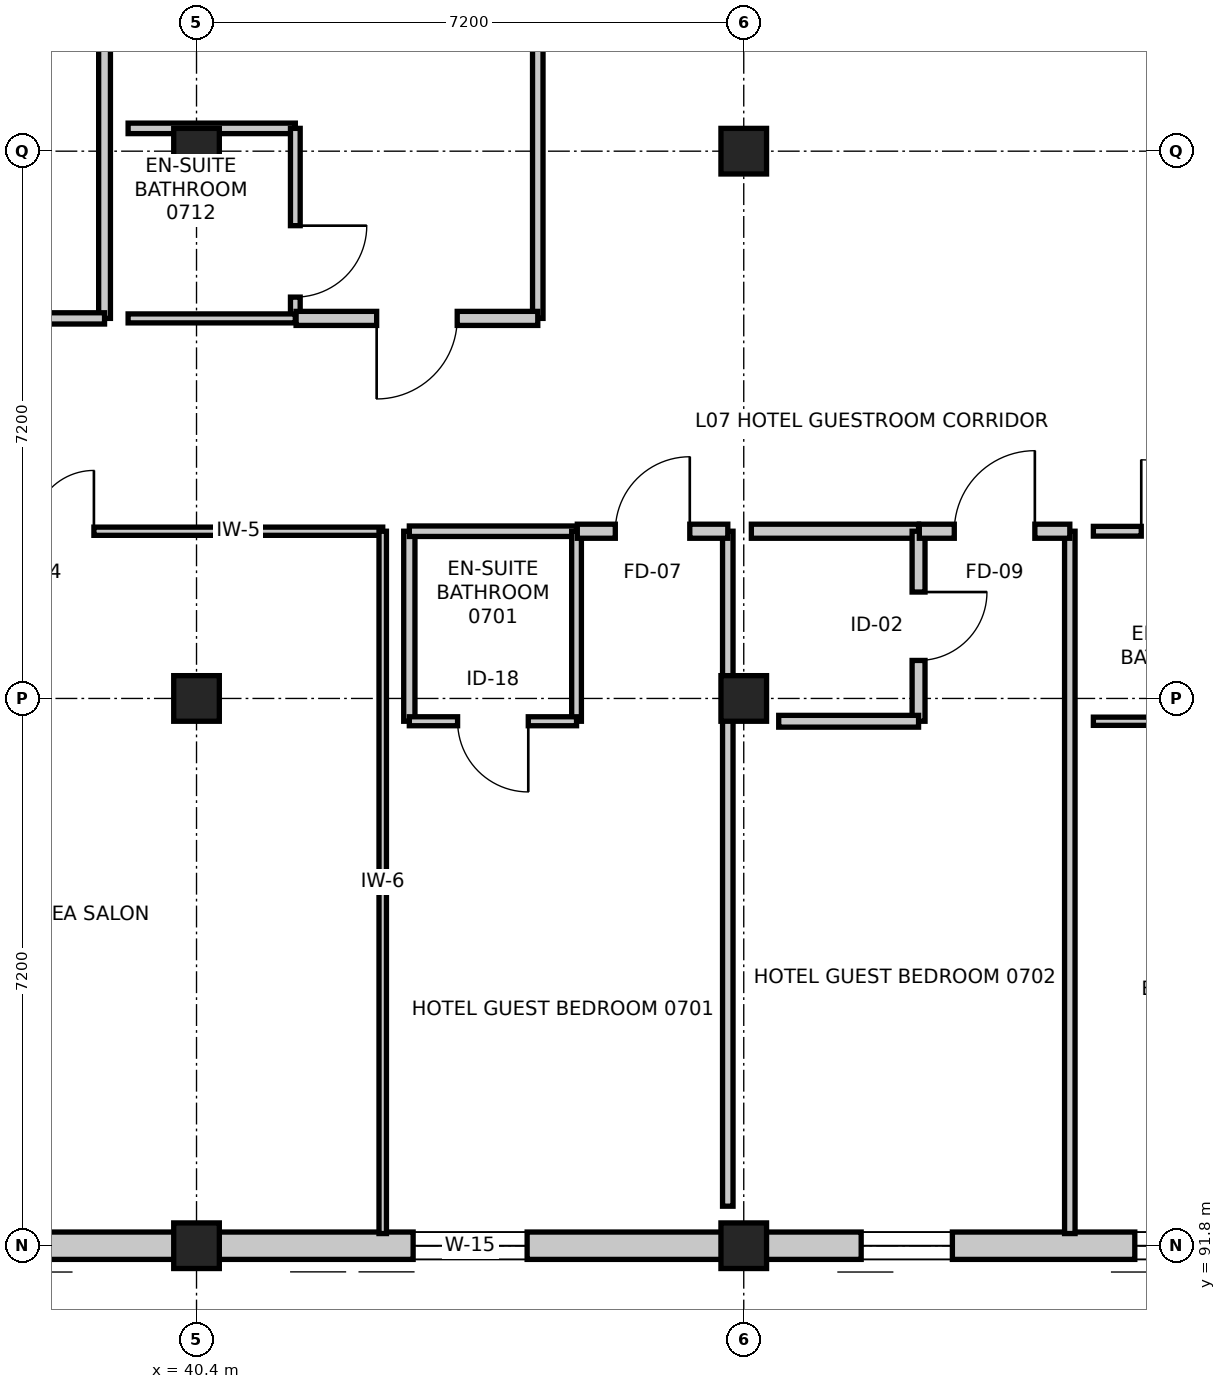
"""IFC4 building model, lengths in metres.
Left out: names, types, materials, properties, quantities, classifications, styles, units other than length and angle.
Written with IfcOpenShell. Run it as: python <this file> out.ifc"""

import sys

from ifc_helpers import new_model, si_unit, direction, frame, frame_2d, origin, origin_2d, place, context, subcontext, project, spatial, rectangle, extrude, element, fill, save


model = new_model("IFC4")
c1 = context("Model", 3, precision=1e-05, world=origin(), true_north=direction((0.0, 1.0)))
c2 = subcontext(c1, "Body", "Model", "MODEL_VIEW")
j1 = project(units=[si_unit("LENGTHUNIT", "METRE"), si_unit("PLANEANGLEUNIT", "RADIAN")], contexts=[c1])
p1 = place(None, origin())
s1 = spatial("IfcSite", under=j1, at=p1, CompositionType="ELEMENT")
p2 = place(p1, origin())
s2 = spatial("IfcBuilding", under=s1, at=p2, CompositionType="ELEMENT")
p3 = place(p2, frame((0.0, 0.0, 30.0)))
s3 = spatial("IfcBuildingStorey", under=s2, at=p3, CompositionType="ELEMENT", Elevation=30.0)
for number, where, z_axis, x_axis in (
    (1, (40.4, 91.8, 0.0), (0.0, 0.0, 1.0), (1.0, 0.0, 0.0)),
    (2, (40.4, 99.0, 0.0), (0.0, 0.0, 1.0), (1.0, 0.0, 0.0)),
    (3, (40.4, 106.2, 0.0), (0.0, 0.0, 1.0), (1.0, 0.0, 0.0)),
    (4, (47.6, 91.8, 0.0), (0.0, 0.0, 1.0), (1.0, 0.0, 0.0)),
    (5, (47.6, 99.0, 0.0), (0.0, 0.0, 1.0), (1.0, 0.0, 0.0)),
    (6, (47.6, 106.2, 0.0), (0.0, 0.0, 1.0), (1.0, 0.0, 0.0)),
):
    element("IfcColumn", number, at=place(p3, frame(where, z_axis=z_axis, x_axis=x_axis)), inside=s3, PredefinedType="COLUMN", context=c2, shape_type="SweptSolid", body=[
        extrude(rectangle(XDim=0.6, YDim=0.6, at=origin_2d()), origin(), (0.0, 0.0, 1.0), 3.6),
    ])
p4 = place(p3, frame((54.8, 91.8, 0.0), z_axis=(0.0, 0.0, 1.0), x_axis=(-1.0, 0.0, 0.0)))
e7 = element("IfcWall", 7, at=p4, inside=s3, PredefinedType="STANDARD", context=c2, shape_type="SweptSolid", body=[
    extrude(rectangle(XDim=7.2, YDim=0.36, at=frame_2d((3.6, 0.0))), origin(), (0.0, 0.0, 1.0), 2.745),
])
p5 = place(p4, frame((0.855, 0.0, 0.75)))
e8 = element("IfcOpeningElement", 8, at=p5, cuts=e7, PredefinedType="OPENING", context=c2, shape_type="SweptSolid", body=[
    extrude(rectangle(XDim=1.2, YDim=1.5, at=frame_2d((0.6, 0.75))), frame((0.0, 0.19, 0.0), z_axis=(0.0, -1.0, 0.0), x_axis=(1.0, 0.0, 0.0)), (0.0, 0.0, 1.0), 0.38),
])
p6 = place(p4, frame((4.455, 0.0, 0.75)))
e9 = element("IfcOpeningElement", 9, at=p6, cuts=e7, PredefinedType="OPENING", context=c2, shape_type="SweptSolid", body=[
    extrude(rectangle(XDim=1.2, YDim=1.5, at=frame_2d((0.6, 0.75))), frame((0.0, 0.19, 0.0), z_axis=(0.0, -1.0, 0.0), x_axis=(1.0, 0.0, 0.0)), (0.0, 0.0, 1.0), 0.38),
])
p7 = place(p3, frame((47.6, 91.8, 0.0), z_axis=(0.0, 0.0, 1.0), x_axis=(-1.0, 0.0, 0.0)))
e10 = element("IfcWall", 10, at=p7, inside=s3, PredefinedType="STANDARD", context=c2, shape_type="SweptSolid", body=[
    extrude(rectangle(XDim=7.2, YDim=0.36, at=frame_2d((3.6, 0.0))), origin(), (0.0, 0.0, 1.0), 2.745),
])
p8 = place(p7, frame((2.85, 0.0, 0.75)))
e11 = element("IfcOpeningElement", 11, at=p8, cuts=e10, PredefinedType="OPENING", context=c2, shape_type="SweptSolid", body=[
    extrude(rectangle(XDim=1.5, YDim=1.5, at=frame_2d((0.75, 0.75))), frame((0.0, 0.19, 0.0), z_axis=(0.0, -1.0, 0.0), x_axis=(1.0, 0.0, 0.0)), (0.0, 0.0, 1.0), 0.38),
])
p9 = place(p3, frame((40.4, 91.8, 0.0), z_axis=(0.0, 0.0, 1.0), x_axis=(-1.0, 0.0, 0.0)))
e12 = element("IfcWall", 12, at=p9, inside=s3, PredefinedType="STANDARD", context=c2, shape_type="SweptSolid", body=[
    extrude(rectangle(XDim=7.2, YDim=0.36, at=frame_2d((3.6, 0.0))), origin(), (0.0, 0.0, 1.0), 2.745),
])
p10 = place(p9, frame((2.85, 0.0, 0.75)))
e13 = element("IfcOpeningElement", 13, at=p10, cuts=e12, PredefinedType="OPENING", context=c2, shape_type="SweptSolid", body=[
    extrude(rectangle(XDim=1.5, YDim=1.5, at=frame_2d((0.75, 0.75))), frame((0.0, 0.19, 0.0), z_axis=(0.0, -1.0, 0.0), x_axis=(1.0, 0.0, 0.0)), (0.0, 0.0, 1.0), 0.38),
])
p11 = place(p3, frame((33.65, 101.2, 0.0), z_axis=(0.0, 0.0, 1.0), x_axis=(1.0, 0.0, 0.0)))
e14 = element("IfcWall", 14, at=p11, inside=s3, PredefinedType="PARTITIONING", context=c2, shape_type="SweptSolid", body=[
    extrude(rectangle(XDim=9.2, YDim=0.108, at=frame_2d((4.6, 0.0))), origin(), (0.0, 0.0, 1.0), 2.695),
])
p12 = place(p11, frame((3.8, 0.0, 0.0)))
e15 = element("IfcOpeningElement", 15, at=p12, cuts=e14, PredefinedType="OPENING", context=c2, shape_type="SweptSolid", body=[
    extrude(rectangle(XDim=1.6, YDim=2.15, at=frame_2d((0.8, 1.075))), frame((0.0, 0.064, 0.0), z_axis=(0.0, -1.0, 0.0), x_axis=(1.0, 0.0, 0.0)), (0.0, 0.0, 1.0), 0.128),
])
p13 = place(p3, frame((42.85, 101.2, 0.0), z_axis=(0.0, 0.0, 1.0), x_axis=(0.0, -1.0, 0.0)))
e16 = element("IfcWall", 16, at=p13, inside=s3, PredefinedType="PARTITIONING", context=c2, shape_type="SweptSolid", body=[
    extrude(rectangle(XDim=9.24, YDim=0.098, at=frame_2d((4.62, 0.0))), origin(), (0.0, 0.0, 1.0), 2.745),
])
p14 = place(p3, frame((43.2, 98.7, 0.0), z_axis=(0.0, 0.0, 1.0), x_axis=(0.0, 1.0, 0.0)))
e17 = element("IfcWall", 17, at=p14, inside=s3, PredefinedType="PARTITIONING", context=c2, shape_type="SweptSolid", body=[
    extrude(rectangle(XDim=2.5, YDim=0.148, at=frame_2d((1.25, 0.0))), origin(), (0.0, 0.0, 1.0), 2.745),
])
p15 = place(p3, frame((43.2, 101.2, 0.0), z_axis=(0.0, 0.0, 1.0), x_axis=(1.0, 0.0, 0.0)))
e18 = element("IfcWall", 18, at=p15, inside=s3, PredefinedType="PARTITIONING", context=c2, shape_type="SweptSolid", body=[
    extrude(rectangle(XDim=2.2, YDim=0.138, at=frame_2d((1.1, 0.0))), origin(), (0.0, 0.0, 1.0), 3.36),
])
p16 = place(p3, frame((45.4, 101.2, 0.0), z_axis=(0.0, 0.0, 1.0), x_axis=(0.0, -1.0, 0.0)))
e19 = element("IfcWall", 19, at=p16, inside=s3, PredefinedType="PARTITIONING", context=c2, shape_type="SweptSolid", body=[
    extrude(rectangle(XDim=2.5, YDim=0.128, at=frame_2d((1.25, 0.0))), origin(), (0.0, 0.0, 1.0), 2.745),
])
p17 = place(p3, frame((45.4, 98.7, 0.0), z_axis=(0.0, 0.0, 1.0), x_axis=(-1.0, 0.0, 0.0)))
e20 = element("IfcWall", 20, at=p17, inside=s3, PredefinedType="PARTITIONING", context=c2, shape_type="SweptSolid", body=[
    extrude(rectangle(XDim=2.2, YDim=0.118, at=frame_2d((1.1, 0.0))), origin(), (0.0, 0.0, 1.0), 3.36),
])
p18 = place(p17, frame((0.635, 0.0, 0.0)))
e21 = element("IfcOpeningElement", 21, at=p18, cuts=e20, PredefinedType="OPENING", context=c2, shape_type="SweptSolid", body=[
    extrude(rectangle(XDim=0.93, YDim=2.13, at=frame_2d((0.465, 1.065))), frame((0.0, 0.069, 0.0), z_axis=(0.0, -1.0, 0.0), x_axis=(1.0, 0.0, 0.0)), (0.0, 0.0, 1.0), 0.138),
])
p19 = place(p3, frame((47.39, 101.2, 0.0), z_axis=(0.0, 0.0, 1.0), x_axis=(0.0, -1.0, 0.0)))
e22 = element("IfcWall", 22, at=p19, inside=s3, PredefinedType="PARTITIONING", context=c2, shape_type="SweptSolid", body=[
    extrude(rectangle(XDim=8.88, YDim=0.138, at=frame_2d((4.44, 0.0))), origin(), (0.0, 0.0, 1.0), 2.695),
])
p20 = place(p3, frame((45.41, 101.2, 0.0), z_axis=(0.0, 0.0, 1.0), x_axis=(1.0, 0.0, 0.0)))
e23 = element("IfcWall", 23, at=p20, inside=s3, PredefinedType="PARTITIONING", context=c2, shape_type="SweptSolid", body=[
    extrude(rectangle(XDim=1.98, YDim=0.185, at=frame_2d((0.99, 0.0))), origin(), (0.0, 0.0, 1.0), 2.695),
])
p21 = place(p20, frame((0.5, 0.0, 0.0)))
e24 = element("IfcOpeningElement", 24, at=p21, cuts=e23, PredefinedType="OPENING", context=c2, shape_type="SweptSolid", body=[
    extrude(rectangle(XDim=0.98, YDim=2.15, at=frame_2d((0.49, 1.075))), frame((0.0, 0.103, 0.0), z_axis=(0.0, -1.0, 0.0), x_axis=(1.0, 0.0, 0.0)), (0.0, 0.0, 1.0), 0.205),
])
p22 = place(p3, frame((47.7, 101.2, 0.0), z_axis=(0.0, 0.0, 1.0), x_axis=(1.0, 0.0, 0.0)))
e25 = element("IfcWall", 25, at=p22, inside=s3, PredefinedType="PARTITIONING", context=c2, shape_type="SweptSolid", body=[
    extrude(rectangle(XDim=2.2, YDim=0.185, at=frame_2d((1.1, 0.0))), origin(), (0.0, 0.0, 1.0), 2.695),
])
p23 = place(p3, frame((49.9, 101.2, 0.0), z_axis=(0.0, 0.0, 1.0), x_axis=(0.0, -1.0, 0.0)))
e26 = element("IfcWall", 26, at=p23, inside=s3, PredefinedType="PARTITIONING", context=c2, shape_type="SweptSolid", body=[
    extrude(rectangle(XDim=2.5, YDim=0.17, at=frame_2d((1.25, 0.0))), origin(), (0.0, 0.0, 1.0), 2.745),
])
p24 = place(p23, frame((0.8, 0.0, 0.0)))
e27 = element("IfcOpeningElement", 27, at=p24, cuts=e26, PredefinedType="OPENING", context=c2, shape_type="SweptSolid", body=[
    extrude(rectangle(XDim=0.9, YDim=2.08, at=frame_2d((0.45, 1.04))), frame((0.0, 0.095, 0.0), z_axis=(0.0, -1.0, 0.0), x_axis=(1.0, 0.0, 0.0)), (0.0, 0.0, 1.0), 0.19),
])
p25 = place(p3, frame((49.9, 98.7, 0.0), z_axis=(0.0, 0.0, 1.0), x_axis=(-1.0, 0.0, 0.0)))
e28 = element("IfcWall", 28, at=p25, inside=s3, PredefinedType="PARTITIONING", context=c2, shape_type="SweptSolid", body=[
    extrude(rectangle(XDim=1.84, YDim=0.155, at=frame_2d((0.92, 0.0))), origin(), (0.0, 0.0, 1.0), 3.36),
])
p26 = place(p3, frame((51.89, 101.2, 0.0), z_axis=(0.0, 0.0, 1.0), x_axis=(0.0, -1.0, 0.0)))
e29 = element("IfcWall", 29, at=p26, inside=s3, PredefinedType="PARTITIONING", context=c2, shape_type="SweptSolid", body=[
    extrude(rectangle(XDim=9.24, YDim=0.138, at=frame_2d((4.62, 0.0))), origin(), (0.0, 0.0, 1.0), 2.745),
])
p27 = place(p3, frame((49.91, 101.2, 0.0), z_axis=(0.0, 0.0, 1.0), x_axis=(1.0, 0.0, 0.0)))
e30 = element("IfcWall", 30, at=p27, inside=s3, PredefinedType="PARTITIONING", context=c2, shape_type="SweptSolid", body=[
    extrude(rectangle(XDim=1.98, YDim=0.185, at=frame_2d((0.99, 0.0))), origin(), (0.0, 0.0, 1.0), 3.36),
])
p28 = place(p27, frame((0.46, 0.0, 0.0)))
e31 = element("IfcOpeningElement", 31, at=p28, cuts=e30, PredefinedType="OPENING", context=c2, shape_type="SweptSolid", body=[
    extrude(rectangle(XDim=1.06, YDim=2.2, at=frame_2d((0.53, 1.1))), frame((0.0, 0.103, 0.0), z_axis=(0.0, -1.0, 0.0), x_axis=(1.0, 0.0, 0.0)), (0.0, 0.0, 1.0), 0.205),
])
p29 = place(p3, frame((52.2, 101.2, 0.0), z_axis=(0.0, 0.0, 1.0), x_axis=(1.0, 0.0, 0.0)))
e32 = element("IfcWall", 32, at=p29, inside=s3, PredefinedType="PARTITIONING", context=c2, shape_type="SweptSolid", body=[
    extrude(rectangle(XDim=2.2, YDim=0.128, at=frame_2d((1.1, 0.0))), origin(), (0.0, 0.0, 1.0), 3.36),
])
p30 = place(p29, frame((0.63, 0.0, 0.0)))
e33 = element("IfcOpeningElement", 33, at=p30, cuts=e32, PredefinedType="OPENING", context=c2, shape_type="SweptSolid", body=[
    extrude(rectangle(XDim=0.94, YDim=2.12, at=frame_2d((0.47, 1.06))), frame((0.0, 0.074, 0.0), z_axis=(0.0, -1.0, 0.0), x_axis=(1.0, 0.0, 0.0)), (0.0, 0.0, 1.0), 0.148),
])
p31 = place(p3, frame((54.4, 98.7, 0.0), z_axis=(0.0, 0.0, 1.0), x_axis=(-1.0, 0.0, 0.0)))
e34 = element("IfcWall", 34, at=p31, inside=s3, PredefinedType="PARTITIONING", context=c2, shape_type="SweptSolid", body=[
    extrude(rectangle(XDim=2.2, YDim=0.108, at=frame_2d((1.1, 0.0))), origin(), (0.0, 0.0, 1.0), 3.36),
])
p32 = place(p3, frame((39.19, 113.146, 0.0), z_axis=(0.0, 0.0, 1.0), x_axis=(0.0, -1.0, 0.0)))
e35 = element("IfcWall", 35, at=p32, inside=s3, PredefinedType="PARTITIONING", context=c2, shape_type="SweptSolid", body=[
    extrude(rectangle(XDim=9.146, YDim=0.155, at=frame_2d((4.573, 0.0))), origin(), (0.0, 0.0, 1.0), 2.745),
])
p33 = place(p3, frame((39.19, 104.0, 0.0), z_axis=(0.0, 0.0, 1.0), x_axis=(-1.0, 0.0, 0.0)))
e36 = element("IfcWall", 36, at=p33, inside=s3, PredefinedType="PARTITIONING", context=c2, shape_type="SweptSolid", body=[
    extrude(rectangle(XDim=3.18, YDim=0.148, at=frame_2d((1.59, 0.0))), origin(), (0.0, 0.0, 1.0), 3.36),
])
p34 = place(p33, frame((1.1, 0.0, 0.0)))
e37 = element("IfcOpeningElement", 37, at=p34, cuts=e36, PredefinedType="OPENING", context=c2, shape_type="SweptSolid", body=[
    extrude(rectangle(XDim=0.98, YDim=2.15, at=frame_2d((0.49, 1.075))), frame((0.0, 0.084, 0.0), z_axis=(0.0, -1.0, 0.0), x_axis=(1.0, 0.0, 0.0)), (0.0, 0.0, 1.0), 0.168),
])
p35 = place(p3, frame((39.5, 106.5, 0.0), z_axis=(0.0, 0.0, 1.0), x_axis=(1.0, 0.0, 0.0)))
e38 = element("IfcWall", 38, at=p35, inside=s3, PredefinedType="PARTITIONING", context=c2, shape_type="SweptSolid", body=[
    extrude(rectangle(XDim=2.2, YDim=0.138, at=frame_2d((1.1, 0.0))), origin(), (0.0, 0.0, 1.0), 2.695),
])
p36 = place(p3, frame((41.7, 106.5, 0.0), z_axis=(0.0, 0.0, 1.0), x_axis=(0.0, -1.0, 0.0)))
e39 = element("IfcWall", 39, at=p36, inside=s3, PredefinedType="PARTITIONING", context=c2, shape_type="SweptSolid", body=[
    extrude(rectangle(XDim=2.5, YDim=0.128, at=frame_2d((1.25, 0.0))), origin(), (0.0, 0.0, 1.0), 2.745),
])
p37 = place(p36, frame((1.28, 0.0, 0.0)))
e40 = element("IfcOpeningElement", 40, at=p37, cuts=e39, PredefinedType="OPENING", context=c2, shape_type="SweptSolid", body=[
    extrude(rectangle(XDim=0.94, YDim=2.12, at=frame_2d((0.47, 1.06))), frame((0.0, 0.074, 0.0), z_axis=(0.0, -1.0, 0.0), x_axis=(1.0, 0.0, 0.0)), (0.0, 0.0, 1.0), 0.148),
])
p38 = place(p3, frame((41.7, 104.0, 0.0), z_axis=(0.0, 0.0, 1.0), x_axis=(-1.0, 0.0, 0.0)))
e41 = element("IfcWall", 41, at=p38, inside=s3, PredefinedType="PARTITIONING", context=c2, shape_type="SweptSolid", body=[
    extrude(rectangle(XDim=2.2, YDim=0.118, at=frame_2d((1.1, 0.0))), origin(), (0.0, 0.0, 1.0), 2.695),
])
p39 = place(p3, frame((44.89, 113.455, 0.0), z_axis=(0.0, 0.0, 1.0), x_axis=(0.0, -1.0, 0.0)))
e42 = element("IfcWall", 42, at=p39, inside=s3, PredefinedType="PARTITIONING", context=c2, shape_type="SweptSolid", body=[
    extrude(rectangle(XDim=9.455, YDim=0.138, at=frame_2d((4.728, 0.0))), origin(), (0.0, 0.0, 1.0), 2.745),
])
p40 = place(p3, frame((44.89, 104.0, 0.0), z_axis=(0.0, 0.0, 1.0), x_axis=(-1.0, 0.0, 0.0)))
e43 = element("IfcWall", 43, at=p40, inside=s3, PredefinedType="PARTITIONING", context=c2, shape_type="SweptSolid", body=[
    extrude(rectangle(XDim=3.18, YDim=0.185, at=frame_2d((1.59, 0.0))), origin(), (0.0, 0.0, 1.0), 3.36),
])
p41 = place(p40, frame((1.06, 0.0, 0.0)))
e44 = element("IfcOpeningElement", 44, at=p41, cuts=e43, PredefinedType="OPENING", context=c2, shape_type="SweptSolid", body=[
    extrude(rectangle(XDim=1.06, YDim=2.2, at=frame_2d((0.53, 1.1))), frame((0.0, 0.103, 0.0), z_axis=(0.0, -1.0, 0.0), x_axis=(1.0, 0.0, 0.0)), (0.0, 0.0, 1.0), 0.205),
])
p42 = place(p5, origin())
e45 = element("IfcWindow", 45, at=p42, inside=s3, PartitioningType="SINGLE_PANEL", PredefinedType="WINDOW", context=c2, shape_type="SweptSolid", body=[
    extrude(rectangle(XDim=1.2, YDim=1.5, at=frame_2d((0.6, 0.75))), frame((0.0, 0.03, 0.0), z_axis=(0.0, -1.0, 0.0), x_axis=(1.0, 0.0, 0.0)), (0.0, 0.0, 1.0), 0.06),
])
fill(e8, e45)
p43 = place(p8, origin())
e46 = element("IfcWindow", 46, at=p43, inside=s3, PartitioningType="SINGLE_PANEL", PredefinedType="WINDOW", context=c2, shape_type="SweptSolid", body=[
    extrude(rectangle(XDim=1.5, YDim=1.5, at=frame_2d((0.75, 0.75))), frame((0.0, 0.03, 0.0), z_axis=(0.0, -1.0, 0.0), x_axis=(1.0, 0.0, 0.0)), (0.0, 0.0, 1.0), 0.06),
])
fill(e11, e46)
p44 = place(p12, origin())
e47 = element("IfcDoor", 47, at=p44, inside=s3, OperationType="DOUBLE_DOOR_SINGLE_SWING", PredefinedType="DOOR", context=c2, shape_type="SweptSolid", body=[
    extrude(rectangle(XDim=1.6, YDim=2.15, at=frame_2d((0.8, 1.075))), frame((0.0, 0.025, 0.0), z_axis=(0.0, -1.0, 0.0), x_axis=(1.0, 0.0, 0.0)), (0.0, 0.0, 1.0), 0.05),
])
fill(e15, e47)
p45 = place(p18, origin())
e48 = element("IfcDoor", 48, at=p45, inside=s3, OperationType="SINGLE_SWING_LEFT", PredefinedType="DOOR", context=c2, shape_type="SweptSolid", body=[
    extrude(rectangle(XDim=0.93, YDim=2.13, at=frame_2d((0.465, 1.065))), frame((0.0, 0.025, 0.0), z_axis=(0.0, -1.0, 0.0), x_axis=(1.0, 0.0, 0.0)), (0.0, 0.0, 1.0), 0.05),
])
fill(e21, e48)
p46 = place(p21, origin())
e49 = element("IfcDoor", 49, at=p46, inside=s3, OperationType="SINGLE_SWING_RIGHT", PredefinedType="DOOR", context=c2, shape_type="SweptSolid", body=[
    extrude(rectangle(XDim=0.98, YDim=2.15, at=frame_2d((0.49, 1.075))), frame((0.0, 0.025, 0.0), z_axis=(0.0, -1.0, 0.0), x_axis=(1.0, 0.0, 0.0)), (0.0, 0.0, 1.0), 0.05),
])
fill(e24, e49)
p47 = place(p24, origin())
e50 = element("IfcDoor", 50, at=p47, inside=s3, OperationType="SINGLE_SWING_LEFT", PredefinedType="DOOR", context=c2, shape_type="SweptSolid", body=[
    extrude(rectangle(XDim=0.9, YDim=2.08, at=frame_2d((0.45, 1.04))), frame((0.0, 0.025, 0.0), z_axis=(0.0, -1.0, 0.0), x_axis=(1.0, 0.0, 0.0)), (0.0, 0.0, 1.0), 0.05),
])
fill(e27, e50)
p48 = place(p28, origin())
e51 = element("IfcDoor", 51, at=p48, inside=s3, OperationType="SINGLE_SWING_RIGHT", PredefinedType="DOOR", context=c2, shape_type="SweptSolid", body=[
    extrude(rectangle(XDim=1.06, YDim=2.2, at=frame_2d((0.53, 1.1))), frame((0.0, 0.025, 0.0), z_axis=(0.0, -1.0, 0.0), x_axis=(1.0, 0.0, 0.0)), (0.0, 0.0, 1.0), 0.05),
])
fill(e31, e51)
p49 = place(p30, origin())
e52 = element("IfcDoor", 52, at=p49, inside=s3, OperationType="SINGLE_SWING_LEFT", PredefinedType="DOOR", context=c2, shape_type="SweptSolid", body=[
    extrude(rectangle(XDim=0.94, YDim=2.12, at=frame_2d((0.47, 1.06))), frame((0.0, 0.025, 0.0), z_axis=(0.0, -1.0, 0.0), x_axis=(1.0, 0.0, 0.0)), (0.0, 0.0, 1.0), 0.05),
])
fill(e33, e52)
p50 = place(p37, origin())
e53 = element("IfcDoor", 53, at=p50, inside=s3, OperationType="SINGLE_SWING_LEFT", PredefinedType="DOOR", context=c2, shape_type="SweptSolid", body=[
    extrude(rectangle(XDim=0.94, YDim=2.12, at=frame_2d((0.47, 1.06))), frame((0.0, 0.025, 0.0), z_axis=(0.0, -1.0, 0.0), x_axis=(1.0, 0.0, 0.0)), (0.0, 0.0, 1.0), 0.05),
])
fill(e40, e53)
p51 = place(p41, origin())
e54 = element("IfcDoor", 54, at=p51, inside=s3, OperationType="SINGLE_SWING_RIGHT", PredefinedType="DOOR", context=c2, shape_type="SweptSolid", body=[
    extrude(rectangle(XDim=1.06, YDim=2.2, at=frame_2d((0.53, 1.1))), frame((0.0, 0.025, 0.0), z_axis=(0.0, -1.0, 0.0), x_axis=(1.0, 0.0, 0.0)), (0.0, 0.0, 1.0), 0.05),
])
fill(e44, e54)
p52 = place(p6, origin())
e55 = element("IfcWindow", 55, at=p52, inside=s3, PartitioningType="SINGLE_PANEL", PredefinedType="WINDOW", context=c2, shape_type="SweptSolid", body=[
    extrude(rectangle(XDim=1.2, YDim=1.5, at=frame_2d((0.6, 0.75))), frame((0.0, 0.03, 0.0), z_axis=(0.0, -1.0, 0.0), x_axis=(1.0, 0.0, 0.0)), (0.0, 0.0, 1.0), 0.06),
])
fill(e9, e55)
save(model, sys.argv[1])
